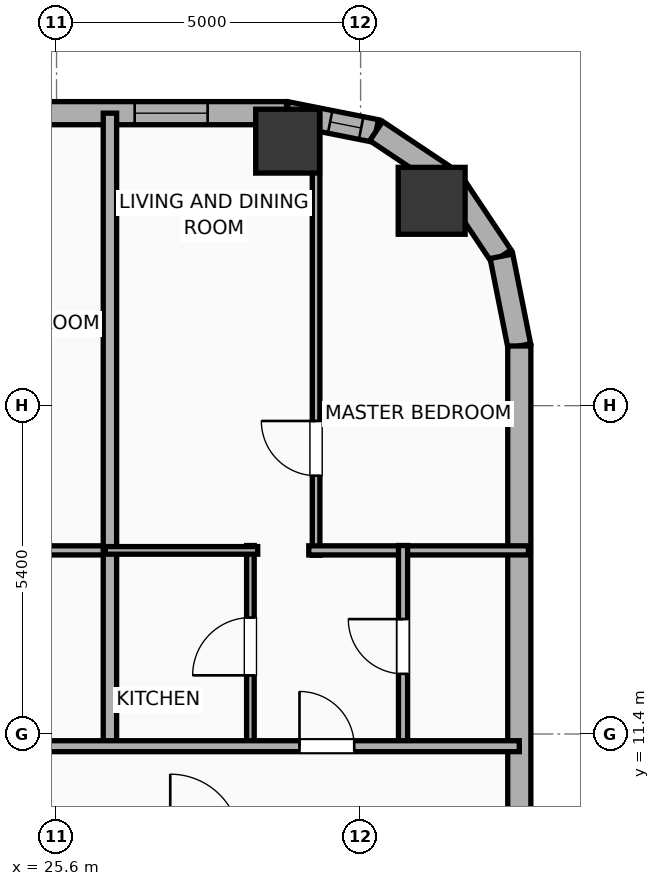
"""IFC4 building model, lengths in metres.
Left out: names, types, materials, properties, quantities, classifications, styles, units other than length and angle.
Written with IfcOpenShell. Run it as: python <this file> out.ifc"""

import sys

from ifc_helpers import new_model, si_unit, direction, frame, frame_2d, origin, origin_2d, place, context, subcontext, project, spatial, rectangle, hollow_rectangle, hollow_circle, extrude, element, fill, save


model = new_model("IFC4")
c1 = context("Model", 3, precision=1e-05, world=origin(), true_north=direction((0.0, 1.0)))
c2 = subcontext(c1, "Body", "Model", "MODEL_VIEW")
j1 = project(units=[si_unit("LENGTHUNIT", "METRE"), si_unit("PLANEANGLEUNIT", "RADIAN")], contexts=[c1])
p1 = place(None, origin())
s1 = spatial("IfcSite", under=j1, at=p1, CompositionType="ELEMENT")
p2 = place(p1, origin())
s2 = spatial("IfcBuilding", under=s1, at=p2, CompositionType="ELEMENT")
p3 = place(p2, frame((0.0, 0.0, 120.9)))
s3 = spatial("IfcBuildingStorey", under=s2, at=p3, CompositionType="ELEMENT", Elevation=120.9)
p4 = place(p3, frame((31.769, 20.169, 0.0), z_axis=(0.0, 0.0, 1.0), x_axis=(1.0, 0.0, 0.0)))
e1 = element("IfcColumn", 1, at=p4, inside=s3, PredefinedType="COLUMN", context=c2, shape_type="SweptSolid", body=[
    extrude(hollow_circle(Radius=0.55, WallThickness=0.036, at=origin_2d()), origin(), (0.0, 0.0, 1.0), 3.9),
])
p5 = place(p3, frame((29.4, 21.15, 0.0), z_axis=(0.0, 0.0, 1.0), x_axis=(1.0, 0.0, 0.0)))
e2 = element("IfcColumn", 2, at=p5, inside=s3, PredefinedType="COLUMN", context=c2, shape_type="SweptSolid", body=[
    extrude(hollow_rectangle(XDim=1.05, YDim=1.05, WallThickness=0.036, at=origin_2d()), origin(), (0.0, 0.0, 1.0), 3.9),
])
p6 = place(p3, frame((-25.381, 21.61, 0.0), z_axis=(0.0, 0.0, 1.0), x_axis=(1.0, 0.0, 0.0)))
e3 = element("IfcWall", 3, at=p6, inside=s3, PredefinedType="ELEMENTEDWALL", context=c2, shape_type="SweptSolid", body=[
    extrude(rectangle(XDim=54.763, YDim=0.38, at=frame_2d((27.381, 0.0))), origin(), (0.0, 0.0, 1.0), 3.65),
])
p7 = place(p6, frame((7.295, 0.0, 0.75)))
e4 = element("IfcOpeningElement", 4, at=p7, cuts=e3, PredefinedType="OPENING", context=c2, shape_type="SweptSolid", body=[
    extrude(rectangle(XDim=2.4, YDim=2.1, at=frame_2d((1.2, 1.05))), frame((0.0, 0.2, 0.0), z_axis=(0.0, -1.0, 0.0), x_axis=(1.0, 0.0, 0.0)), (0.0, 0.0, 1.0), 0.4),
])
p8 = place(p6, frame((17.686, 0.0, 0.75)))
e5 = element("IfcOpeningElement", 5, at=p8, cuts=e3, PredefinedType="OPENING", context=c2, shape_type="SweptSolid", body=[
    extrude(rectangle(XDim=2.4, YDim=2.1, at=frame_2d((1.2, 1.05))), frame((0.0, 0.2, 0.0), z_axis=(0.0, -1.0, 0.0), x_axis=(1.0, 0.0, 0.0)), (0.0, 0.0, 1.0), 0.4),
])
p9 = place(p6, frame((45.867, 0.0, 0.75)))
e6 = element("IfcOpeningElement", 6, at=p9, cuts=e3, PredefinedType="OPENING", context=c2, shape_type="SweptSolid", body=[
    extrude(rectangle(XDim=2.4, YDim=2.1, at=frame_2d((1.2, 1.05))), frame((0.0, 0.2, 0.0), z_axis=(0.0, -1.0, 0.0), x_axis=(1.0, 0.0, 0.0)), (0.0, 0.0, 1.0), 0.4),
])
p10 = place(p6, frame((1.481, 0.0, 0.75)))
e7 = element("IfcOpeningElement", 7, at=p10, cuts=e3, PredefinedType="OPENING", context=c2, shape_type="SweptSolid", body=[
    extrude(rectangle(XDim=1.2, YDim=2.05, at=frame_2d((0.6, 1.025))), frame((0.0, 0.2, 0.0), z_axis=(0.0, -1.0, 0.0), x_axis=(1.0, 0.0, 0.0)), (0.0, 0.0, 1.0), 0.4),
])
p11 = place(p6, frame((4.522, 0.0, 0.75)))
e8 = element("IfcOpeningElement", 8, at=p11, cuts=e3, PredefinedType="OPENING", context=c2, shape_type="SweptSolid", body=[
    extrude(rectangle(XDim=1.2, YDim=2.05, at=frame_2d((0.6, 1.025))), frame((0.0, 0.2, 0.0), z_axis=(0.0, -1.0, 0.0), x_axis=(1.0, 0.0, 0.0)), (0.0, 0.0, 1.0), 0.4),
])
p12 = place(p6, frame((11.696, 0.0, 0.75)))
e9 = element("IfcOpeningElement", 9, at=p12, cuts=e3, PredefinedType="OPENING", context=c2, shape_type="SweptSolid", body=[
    extrude(rectangle(XDim=1.2, YDim=2.05, at=frame_2d((0.6, 1.025))), frame((0.0, 0.2, 0.0), z_axis=(0.0, -1.0, 0.0), x_axis=(1.0, 0.0, 0.0)), (0.0, 0.0, 1.0), 0.4),
])
p13 = place(p6, frame((15.076, 0.0, 0.75)))
e10 = element("IfcOpeningElement", 10, at=p13, cuts=e3, PredefinedType="OPENING", context=c2, shape_type="SweptSolid", body=[
    extrude(rectangle(XDim=1.2, YDim=2.05, at=frame_2d((0.6, 1.025))), frame((0.0, 0.2, 0.0), z_axis=(0.0, -1.0, 0.0), x_axis=(1.0, 0.0, 0.0)), (0.0, 0.0, 1.0), 0.4),
])
p14 = place(p6, frame((22.676, 0.0, 0.75)))
e11 = element("IfcOpeningElement", 11, at=p14, cuts=e3, PredefinedType="OPENING", context=c2, shape_type="SweptSolid", body=[
    extrude(rectangle(XDim=1.2, YDim=2.05, at=frame_2d((0.6, 1.025))), frame((0.0, 0.2, 0.0), z_axis=(0.0, -1.0, 0.0), x_axis=(1.0, 0.0, 0.0)), (0.0, 0.0, 1.0), 0.4),
])
p15 = place(p6, frame((25.576, 0.0, 0.75)))
e12 = element("IfcOpeningElement", 12, at=p15, cuts=e3, PredefinedType="OPENING", context=c2, shape_type="SweptSolid", body=[
    extrude(rectangle(XDim=1.2, YDim=2.05, at=frame_2d((0.6, 1.025))), frame((0.0, 0.2, 0.0), z_axis=(0.0, -1.0, 0.0), x_axis=(1.0, 0.0, 0.0)), (0.0, 0.0, 1.0), 0.4),
])
p16 = place(p6, frame((29.076, 0.0, 0.75)))
e13 = element("IfcOpeningElement", 13, at=p16, cuts=e3, PredefinedType="OPENING", context=c2, shape_type="SweptSolid", body=[
    extrude(rectangle(XDim=1.2, YDim=2.05, at=frame_2d((0.6, 1.025))), frame((0.0, 0.2, 0.0), z_axis=(0.0, -1.0, 0.0), x_axis=(1.0, 0.0, 0.0)), (0.0, 0.0, 1.0), 0.4),
])
p17 = place(p6, frame((33.591, 0.0, 0.75)))
e14 = element("IfcOpeningElement", 14, at=p17, cuts=e3, PredefinedType="OPENING", context=c2, shape_type="SweptSolid", body=[
    extrude(rectangle(XDim=0.85, YDim=2.05, at=frame_2d((0.425, 1.025))), frame((0.0, 0.2, 0.0), z_axis=(0.0, -1.0, 0.0), x_axis=(1.0, 0.0, 0.0)), (0.0, 0.0, 1.0), 0.4),
])
p18 = place(p6, frame((36.076, 0.0, 0.75)))
e15 = element("IfcOpeningElement", 15, at=p18, cuts=e3, PredefinedType="OPENING", context=c2, shape_type="SweptSolid", body=[
    extrude(rectangle(XDim=1.2, YDim=2.05, at=frame_2d((0.6, 1.025))), frame((0.0, 0.2, 0.0), z_axis=(0.0, -1.0, 0.0), x_axis=(1.0, 0.0, 0.0)), (0.0, 0.0, 1.0), 0.4),
])
p19 = place(p6, frame((39.446, 0.0, 0.75)))
e16 = element("IfcOpeningElement", 16, at=p19, cuts=e3, PredefinedType="OPENING", context=c2, shape_type="SweptSolid", body=[
    extrude(rectangle(XDim=1.2, YDim=2.05, at=frame_2d((0.6, 1.025))), frame((0.0, 0.2, 0.0), z_axis=(0.0, -1.0, 0.0), x_axis=(1.0, 0.0, 0.0)), (0.0, 0.0, 1.0), 0.4),
])
p20 = place(p6, frame((42.27, 0.0, 0.75)))
e17 = element("IfcOpeningElement", 17, at=p20, cuts=e3, PredefinedType="OPENING", context=c2, shape_type="SweptSolid", body=[
    extrude(rectangle(XDim=0.85, YDim=2.05, at=frame_2d((0.425, 1.025))), frame((0.0, 0.2, 0.0), z_axis=(0.0, -1.0, 0.0), x_axis=(1.0, 0.0, 0.0)), (0.0, 0.0, 1.0), 0.4),
])
p21 = place(p6, frame((49.554, 0.0, 0.75)))
e18 = element("IfcOpeningElement", 18, at=p21, cuts=e3, PredefinedType="OPENING", context=c2, shape_type="SweptSolid", body=[
    extrude(rectangle(XDim=1.2, YDim=2.05, at=frame_2d((0.6, 1.025))), frame((0.0, 0.2, 0.0), z_axis=(0.0, -1.0, 0.0), x_axis=(1.0, 0.0, 0.0)), (0.0, 0.0, 1.0), 0.4),
])
p22 = place(p6, frame((52.266, 0.0, 0.75)))
e19 = element("IfcOpeningElement", 19, at=p22, cuts=e3, PredefinedType="OPENING", context=c2, shape_type="SweptSolid", body=[
    extrude(rectangle(XDim=1.2, YDim=2.05, at=frame_2d((0.6, 1.025))), frame((0.0, 0.2, 0.0), z_axis=(0.0, -1.0, 0.0), x_axis=(1.0, 0.0, 0.0)), (0.0, 0.0, 1.0), 0.4),
])
p23 = place(p3, frame((29.381, 21.61, 0.0), z_axis=(0.0, 0.0, 1.0), x_axis=(0.980755066645, -0.195242155415, 0.0)))
e20 = element("IfcWall", 20, at=p23, inside=s3, PredefinedType="ELEMENTEDWALL", context=c2, shape_type="SweptSolid", body=[
    extrude(rectangle(XDim=1.504, YDim=0.38, at=frame_2d((0.752, 0.0))), origin(), (0.0, 0.0, 1.0), 3.65),
])
p24 = place(p23, frame((0.732, 0.0, 0.75)))
e21 = element("IfcOpeningElement", 21, at=p24, cuts=e20, PredefinedType="OPENING", context=c2, shape_type="SweptSolid", body=[
    extrude(rectangle(XDim=0.52, YDim=2.05, at=frame_2d((0.26, 1.025))), frame((0.0, 0.2, 0.0), z_axis=(0.0, -1.0, 0.0), x_axis=(1.0, 0.0, 0.0)), (0.0, 0.0, 1.0), 0.4),
])
p25 = place(p3, frame((30.857, 21.316, 0.0), z_axis=(0.0, 0.0, 1.0), x_axis=(0.831468045563, -0.555572577804, 0.0)))
e22 = element("IfcWall", 22, at=p25, inside=s3, PredefinedType="ELEMENTEDWALL", context=c2, shape_type="SweptSolid", body=[
    extrude(rectangle(XDim=1.485, YDim=0.38, at=frame_2d((0.742, 0.0))), origin(), (0.0, 0.0, 1.0), 3.65),
])
p26 = place(p3, frame((32.091, 20.491, 0.0), z_axis=(0.0, 0.0, 1.0), x_axis=(0.555610286119, -0.831442848281, 0.0)))
e23 = element("IfcWall", 23, at=p26, inside=s3, PredefinedType="ELEMENTEDWALL", context=c2, shape_type="SweptSolid", body=[
    extrude(rectangle(XDim=1.485, YDim=0.38, at=frame_2d((0.743, 0.0))), origin(), (0.0, 0.0, 1.0), 3.65),
])
p27 = place(p3, frame((32.917, 19.257, 0.0), z_axis=(0.0, 0.0, 1.0), x_axis=(0.195086038585, -0.980786132421, 0.0)))
e24 = element("IfcWall", 24, at=p27, inside=s3, PredefinedType="ELEMENTEDWALL", context=c2, shape_type="SweptSolid", body=[
    extrude(rectangle(XDim=1.504, YDim=0.38, at=frame_2d((0.752, 0.0))), origin(), (0.0, 0.0, 1.0), 3.65),
])
p28 = place(p3, frame((33.21, 17.781, 0.0), z_axis=(0.0, 0.0, 1.0), x_axis=(0.0, -1.0, 0.0)))
e25 = element("IfcWall", 25, at=p28, inside=s3, PredefinedType="ELEMENTEDWALL", context=c2, shape_type="SweptSolid", body=[
    extrude(rectangle(XDim=34.363, YDim=0.38, at=frame_2d((17.181, 0.0))), origin(), (0.0, 0.0, 1.0), 3.65),
])
p29 = place(p28, frame((12.286, 0.0, 0.75)))
e26 = element("IfcOpeningElement", 26, at=p29, cuts=e25, PredefinedType="OPENING", context=c2, shape_type="SweptSolid", body=[
    extrude(rectangle(XDim=1.2, YDim=2.05, at=frame_2d((0.6, 1.025))), frame((0.0, 0.2, 0.0), z_axis=(0.0, -1.0, 0.0), x_axis=(1.0, 0.0, 0.0)), (0.0, 0.0, 1.0), 0.4),
])
p30 = place(p28, frame((21.936, 0.0, 0.75)))
e27 = element("IfcOpeningElement", 27, at=p30, cuts=e25, PredefinedType="OPENING", context=c2, shape_type="SweptSolid", body=[
    extrude(rectangle(XDim=1.2, YDim=2.05, at=frame_2d((0.6, 1.025))), frame((0.0, 0.2, 0.0), z_axis=(0.0, -1.0, 0.0), x_axis=(1.0, 0.0, 0.0)), (0.0, 0.0, 1.0), 0.4),
])
p31 = place(p3, frame((22.948, 14.42, 0.0), z_axis=(0.0, 0.0, 1.0), x_axis=(1.0, 0.0, 0.0)))
e28 = element("IfcWall", 28, at=p31, inside=s3, PredefinedType="PLUMBINGWALL", context=c2, shape_type="SweptSolid", body=[
    extrude(rectangle(XDim=3.605, YDim=0.15, at=frame_2d((1.802, 0.0))), origin(), (0.0, 0.0, 1.0), 3.65),
])
p32 = place(p3, frame((26.478, 11.12, 0.0), z_axis=(0.0, 0.0, 1.0), x_axis=(0.0, 1.0, 0.0)))
e29 = element("IfcWall", 29, at=p32, inside=s3, PredefinedType="PARTITIONING", context=c2, shape_type="SweptSolid", body=[
    extrude(rectangle(XDim=10.49, YDim=0.22, at=frame_2d((5.245, 0.0))), origin(), (0.0, 0.0, 1.0), 3.65),
])
p33 = place(p3, frame((29.868, 14.34, 0.0), z_axis=(0.0, 0.0, 1.0), x_axis=(0.0, 1.0, 0.0)))
e30 = element("IfcWall", 30, at=p33, inside=s3, PredefinedType="PARTITIONING", context=c2, shape_type="SweptSolid", body=[
    extrude(rectangle(XDim=7.326, YDim=0.125, at=frame_2d((3.663, 0.0))), origin(), (0.0, 0.0, 1.0), 3.65),
])
p34 = place(p33, frame((1.308, 0.0, 0.0)))
e31 = element("IfcOpeningElement", 31, at=p34, cuts=e30, PredefinedType="OPENING", context=c2, shape_type="SweptSolid", body=[
    extrude(rectangle(XDim=0.9, YDim=2.05, at=frame_2d((0.45, 1.025))), frame((0.0, 0.073, 0.0), z_axis=(0.0, -1.0, 0.0), x_axis=(1.0, 0.0, 0.0)), (0.0, 0.0, 1.0), 0.145),
])
p35 = place(p3, frame((29.748, 14.42, 0.0), z_axis=(0.0, 0.0, 1.0), x_axis=(1.0, 0.0, 0.0)))
e32 = element("IfcWall", 32, at=p35, inside=s3, PredefinedType="PLUMBINGWALL", context=c2, shape_type="SweptSolid", body=[
    extrude(rectangle(XDim=3.612, YDim=0.15, at=frame_2d((1.806, 0.0))), origin(), (0.0, 0.0, 1.0), 3.65),
])
p36 = place(p3, frame((28.788, 11.18, 0.0), z_axis=(0.0, 0.0, 1.0), x_axis=(0.0, 1.0, 0.0)))
e33 = element("IfcWall", 33, at=p36, inside=s3, PredefinedType="PARTITIONING", context=c2, shape_type="SweptSolid", body=[
    extrude(rectangle(XDim=3.32, YDim=0.125, at=frame_2d((1.66, 0.0))), origin(), (0.0, 0.0, 1.0), 3.65),
])
p37 = place(p36, frame((1.185, 0.0, 0.0)))
e34 = element("IfcOpeningElement", 34, at=p37, cuts=e33, PredefinedType="OPENING", context=c2, shape_type="SweptSolid", body=[
    extrude(rectangle(XDim=0.95, YDim=2.05, at=frame_2d((0.475, 1.025))), frame((0.0, 0.073, 0.0), z_axis=(0.0, -1.0, 0.0), x_axis=(1.0, 0.0, 0.0)), (0.0, 0.0, 1.0), 0.145),
])
p38 = place(p3, frame((26.403, 14.42, 0.0), z_axis=(0.0, 0.0, 1.0), x_axis=(1.0, 0.0, 0.0)))
e35 = element("IfcWall", 35, at=p38, inside=s3, PredefinedType="PARTITIONING", context=c2, shape_type="SweptSolid", body=[
    extrude(rectangle(XDim=2.505, YDim=0.125, at=frame_2d((1.252, 0.0))), origin(), (0.0, 0.0, 1.0), 3.65),
])
p39 = place(p3, frame((31.298, 11.18, 0.0), z_axis=(0.0, 0.0, 1.0), x_axis=(0.0, 1.0, 0.0)))
e36 = element("IfcWall", 36, at=p39, inside=s3, PredefinedType="PLUMBINGWALL", context=c2, shape_type="SweptSolid", body=[
    extrude(rectangle(XDim=3.32, YDim=0.15, at=frame_2d((1.66, 0.0))), origin(), (0.0, 0.0, 1.0), 3.65),
])
p40 = place(p39, frame((1.21, 0.0, 0.0)))
e37 = element("IfcOpeningElement", 37, at=p40, cuts=e36, PredefinedType="OPENING", context=c2, shape_type="SweptSolid", body=[
    extrude(rectangle(XDim=0.9, YDim=2.05, at=frame_2d((0.45, 1.025))), frame((0.0, 0.085, 0.0), z_axis=(0.0, -1.0, 0.0), x_axis=(1.0, 0.0, 0.0)), (0.0, 0.0, 1.0), 0.17),
])
p41 = place(p3, frame((-29.21, 11.2, 0.0), z_axis=(0.0, 0.0, 1.0), x_axis=(1.0, 0.0, 0.0)))
e38 = element("IfcWall", 38, at=p41, inside=s3, PredefinedType="PARTITIONING", context=c2, shape_type="SweptSolid", body=[
    extrude(rectangle(XDim=62.42, YDim=0.18, at=frame_2d((31.21, 0.0))), origin(), (0.0, 0.0, 1.0), 3.65),
])
p42 = place(p41, frame((3.108, 0.0, 0.0)))
e39 = element("IfcOpeningElement", 39, at=p42, cuts=e38, PredefinedType="OPENING", context=c2, shape_type="SweptSolid", body=[
    extrude(rectangle(XDim=1.15, YDim=2.05, at=frame_2d((0.575, 1.025))), frame((0.0, 0.1, 0.0), z_axis=(0.0, -1.0, 0.0), x_axis=(1.0, 0.0, 0.0)), (0.0, 0.0, 1.0), 0.2),
])
p43 = place(p41, frame((10.242, 0.0, 0.0)))
e40 = element("IfcOpeningElement", 40, at=p43, cuts=e38, PredefinedType="OPENING", context=c2, shape_type="SweptSolid", body=[
    extrude(rectangle(XDim=1.15, YDim=2.05, at=frame_2d((0.575, 1.025))), frame((0.0, 0.1, 0.0), z_axis=(0.0, -1.0, 0.0), x_axis=(1.0, 0.0, 0.0)), (0.0, 0.0, 1.0), 0.2),
])
p44 = place(p41, frame((17.427, 0.0, 0.0)))
e41 = element("IfcOpeningElement", 41, at=p44, cuts=e38, PredefinedType="OPENING", context=c2, shape_type="SweptSolid", body=[
    extrude(rectangle(XDim=0.9, YDim=2.05, at=frame_2d((0.45, 1.025))), frame((0.0, 0.1, 0.0), z_axis=(0.0, -1.0, 0.0), x_axis=(1.0, 0.0, 0.0)), (0.0, 0.0, 1.0), 0.2),
])
p45 = place(p41, frame((24.424, 0.0, 0.0)))
e42 = element("IfcOpeningElement", 42, at=p45, cuts=e38, PredefinedType="OPENING", context=c2, shape_type="SweptSolid", body=[
    extrude(rectangle(XDim=0.9, YDim=2.05, at=frame_2d((0.45, 1.025))), frame((0.0, 0.1, 0.0), z_axis=(0.0, -1.0, 0.0), x_axis=(1.0, 0.0, 0.0)), (0.0, 0.0, 1.0), 0.2),
])
p46 = place(p41, frame((31.428, 0.0, 0.0)))
e43 = element("IfcOpeningElement", 43, at=p46, cuts=e38, PredefinedType="OPENING", context=c2, shape_type="SweptSolid", body=[
    extrude(rectangle(XDim=0.9, YDim=2.05, at=frame_2d((0.45, 1.025))), frame((0.0, 0.1, 0.0), z_axis=(0.0, -1.0, 0.0), x_axis=(1.0, 0.0, 0.0)), (0.0, 0.0, 1.0), 0.2),
])
p47 = place(p41, frame((38.425, 0.0, 0.0)))
e44 = element("IfcOpeningElement", 44, at=p47, cuts=e38, PredefinedType="OPENING", context=c2, shape_type="SweptSolid", body=[
    extrude(rectangle(XDim=0.9, YDim=2.05, at=frame_2d((0.45, 1.025))), frame((0.0, 0.1, 0.0), z_axis=(0.0, -1.0, 0.0), x_axis=(1.0, 0.0, 0.0)), (0.0, 0.0, 1.0), 0.2),
])
p48 = place(p41, frame((45.298, 0.0, 0.0)))
e45 = element("IfcOpeningElement", 45, at=p48, cuts=e38, PredefinedType="OPENING", context=c2, shape_type="SweptSolid", body=[
    extrude(rectangle(XDim=0.9, YDim=2.05, at=frame_2d((0.45, 1.025))), frame((0.0, 0.1, 0.0), z_axis=(0.0, -1.0, 0.0), x_axis=(1.0, 0.0, 0.0)), (0.0, 0.0, 1.0), 0.2),
])
p49 = place(p41, frame((52.033, 0.0, 0.0)))
e46 = element("IfcOpeningElement", 46, at=p49, cuts=e38, PredefinedType="OPENING", context=c2, shape_type="SweptSolid", body=[
    extrude(rectangle(XDim=0.9, YDim=2.05, at=frame_2d((0.45, 1.025))), frame((0.0, 0.1, 0.0), z_axis=(0.0, -1.0, 0.0), x_axis=(1.0, 0.0, 0.0)), (0.0, 0.0, 1.0), 0.2),
])
p50 = place(p41, frame((58.805, 0.0, 0.0)))
e47 = element("IfcOpeningElement", 47, at=p50, cuts=e38, PredefinedType="OPENING", context=c2, shape_type="SweptSolid", body=[
    extrude(rectangle(XDim=0.9, YDim=2.05, at=frame_2d((0.45, 1.025))), frame((0.0, 0.1, 0.0), z_axis=(0.0, -1.0, 0.0), x_axis=(1.0, 0.0, 0.0)), (0.0, 0.0, 1.0), 0.2),
])
p51 = place(p22, origin())
e48 = element("IfcWindow", 48, at=p51, inside=s3, PartitioningType="SINGLE_PANEL", PredefinedType="WINDOW", context=c2, shape_type="SweptSolid", body=[
    extrude(rectangle(XDim=1.2, YDim=2.05, at=frame_2d((0.6, 1.025))), frame((0.0, 0.03, 0.0), z_axis=(0.0, -1.0, 0.0), x_axis=(1.0, 0.0, 0.0)), (0.0, 0.0, 1.0), 0.06),
])
fill(e19, e48)
p52 = place(p24, origin())
e49 = element("IfcWindow", 49, at=p52, inside=s3, PartitioningType="SINGLE_PANEL", PredefinedType="WINDOW", context=c2, shape_type="SweptSolid", body=[
    extrude(rectangle(XDim=0.52, YDim=2.05, at=frame_2d((0.26, 1.025))), frame((0.0, 0.03, 0.0), z_axis=(0.0, -1.0, 0.0), x_axis=(1.0, 0.0, 0.0)), (0.0, 0.0, 1.0), 0.06),
])
fill(e21, e49)
p53 = place(p34, origin())
e50 = element("IfcDoor", 50, at=p53, inside=s3, OperationType="SINGLE_SWING_RIGHT", PredefinedType="DOOR", context=c2, shape_type="SweptSolid", body=[
    extrude(rectangle(XDim=0.9, YDim=2.05, at=frame_2d((0.45, 1.025))), frame((0.0, 0.025, 0.0), z_axis=(0.0, -1.0, 0.0), x_axis=(1.0, 0.0, 0.0)), (0.0, 0.0, 1.0), 0.05),
])
fill(e31, e50)
p54 = place(p37, origin())
e51 = element("IfcDoor", 51, at=p54, inside=s3, OperationType="SINGLE_SWING_LEFT", PredefinedType="DOOR", context=c2, shape_type="SweptSolid", body=[
    extrude(rectangle(XDim=0.95, YDim=2.05, at=frame_2d((0.475, 1.025))), frame((0.0, 0.025, 0.0), z_axis=(0.0, -1.0, 0.0), x_axis=(1.0, 0.0, 0.0)), (0.0, 0.0, 1.0), 0.05),
])
fill(e34, e51)
p55 = place(p40, origin())
e52 = element("IfcDoor", 52, at=p55, inside=s3, OperationType="SINGLE_SWING_RIGHT", PredefinedType="DOOR", context=c2, shape_type="SweptSolid", body=[
    extrude(rectangle(XDim=0.9, YDim=2.05, at=frame_2d((0.45, 1.025))), frame((0.0, 0.025, 0.0), z_axis=(0.0, -1.0, 0.0), x_axis=(1.0, 0.0, 0.0)), (0.0, 0.0, 1.0), 0.05),
])
fill(e37, e52)
p56 = place(p50, origin())
e53 = element("IfcDoor", 53, at=p56, inside=s3, OperationType="SINGLE_SWING_LEFT", PredefinedType="DOOR", context=c2, shape_type="SweptSolid", body=[
    extrude(rectangle(XDim=0.9, YDim=2.05, at=frame_2d((0.45, 1.025))), frame((0.0, 0.025, 0.0), z_axis=(0.0, -1.0, 0.0), x_axis=(1.0, 0.0, 0.0)), (0.0, 0.0, 1.0), 0.05),
])
fill(e47, e53)
save(model, sys.argv[1])
